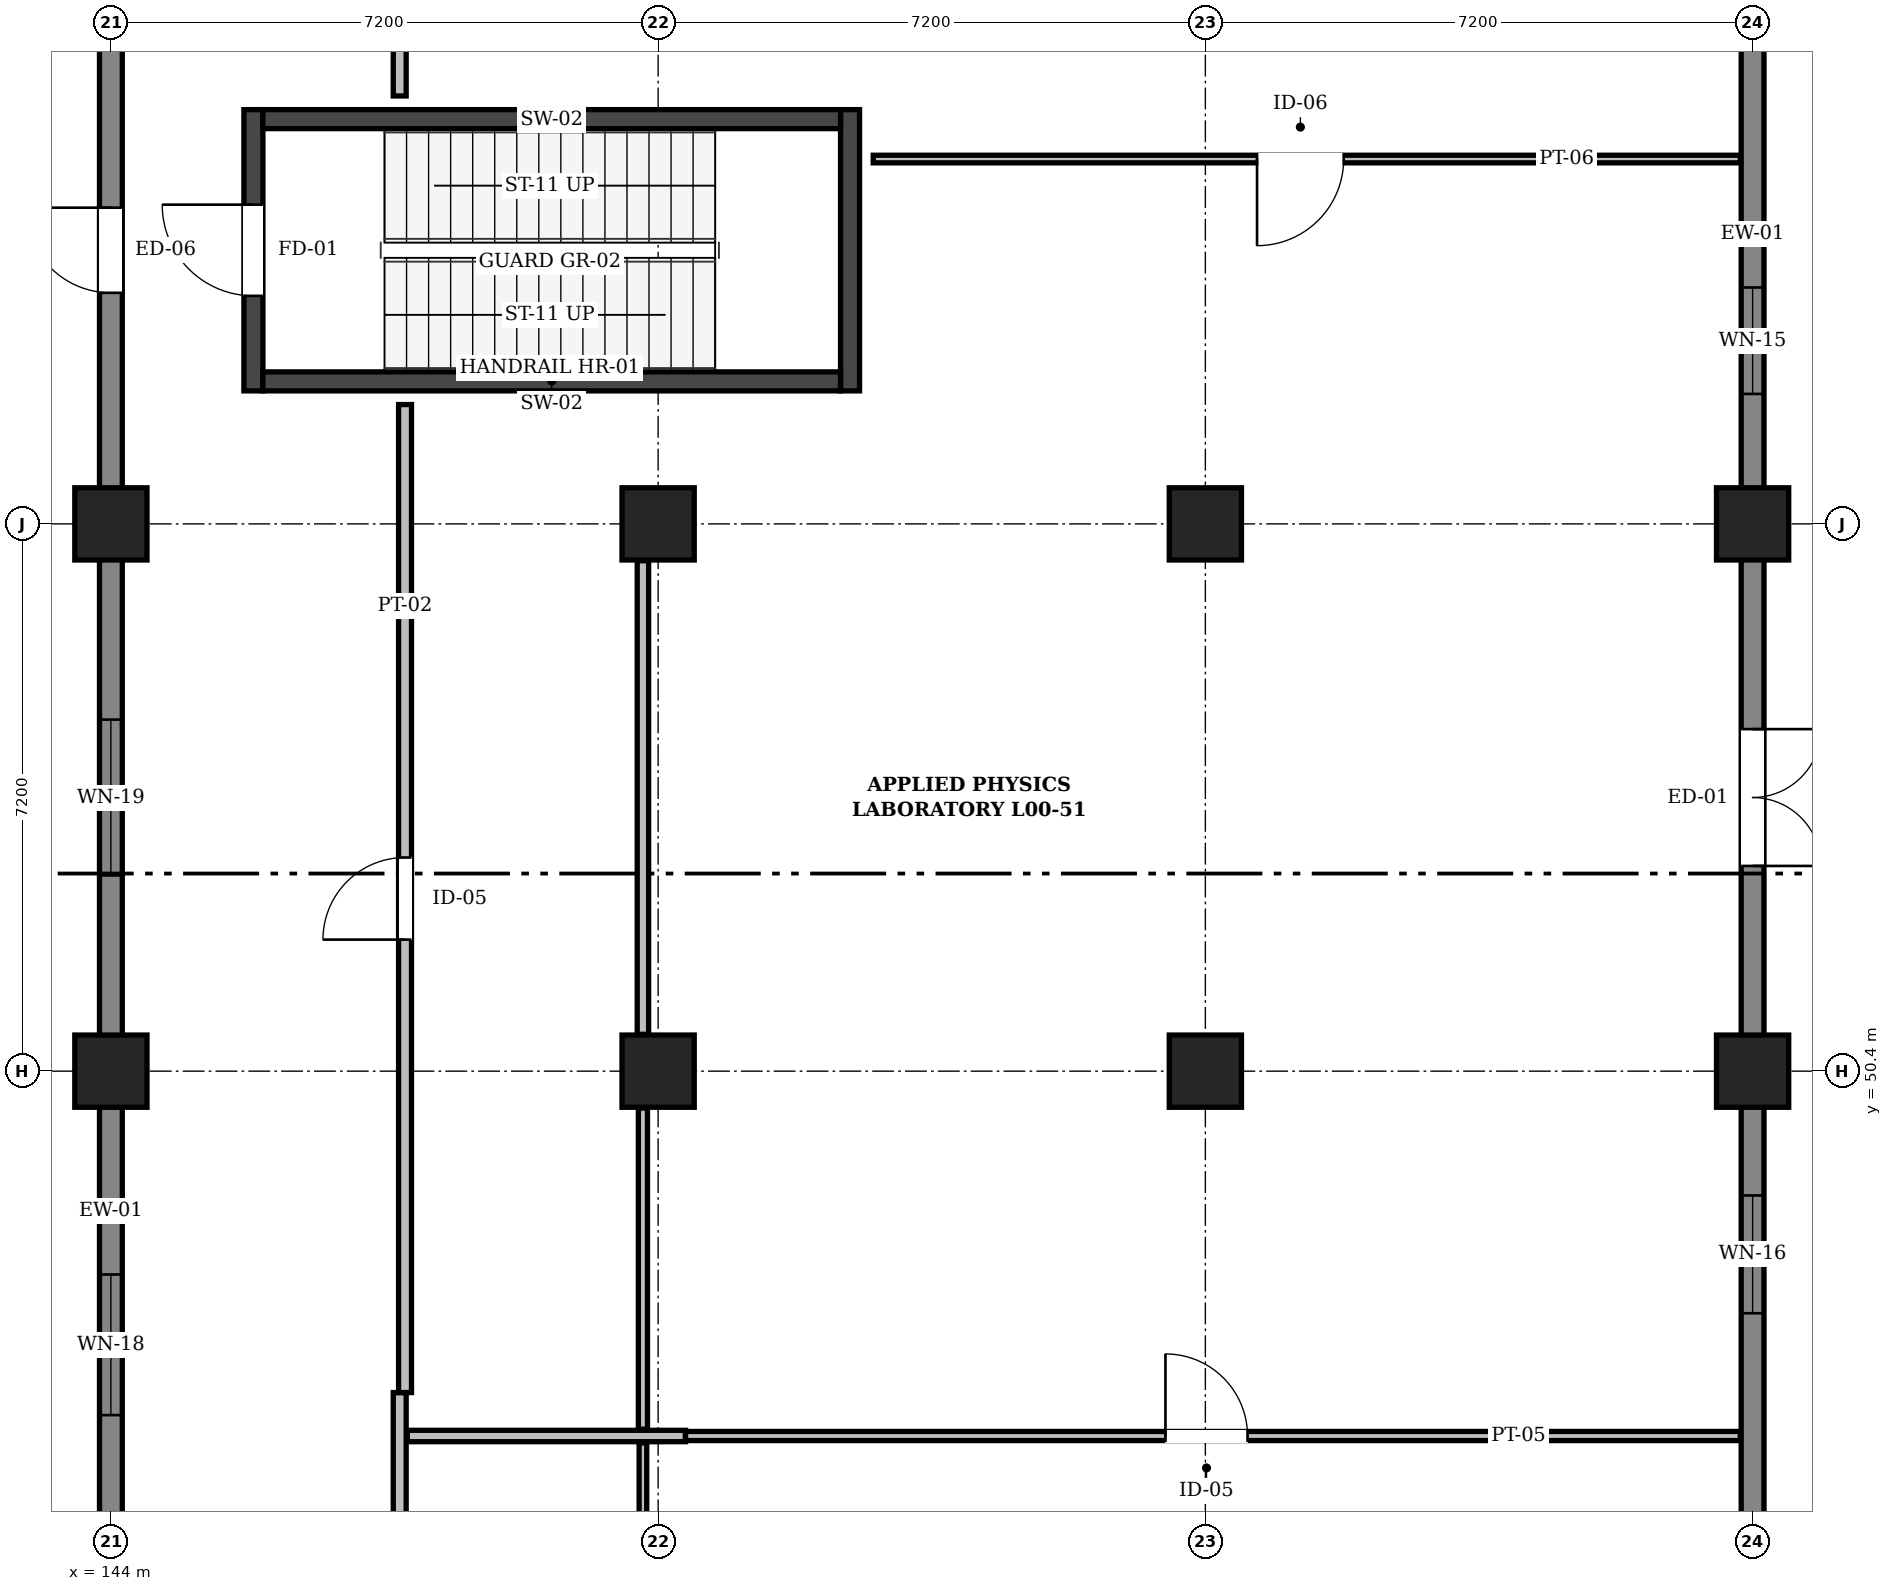
"""IFC4 building model, lengths in metres.
Left out: names, types, materials, properties, quantities, classifications, styles, units other than length and angle.
Written with IfcOpenShell. Run it as: python <this file> out.ifc"""

import sys

from ifc_helpers import new_model, si_unit, direction, frame, frame_2d, origin, origin_2d, place, context, subcontext, project, spatial, rectangle, extrude, element, fill, save


model = new_model("IFC4")
c1 = context("Model", 3, precision=1e-05, world=origin(), true_north=direction((0.0, 1.0)))
c2 = subcontext(c1, "Body", "Model", "MODEL_VIEW")
j1 = project(units=[si_unit("LENGTHUNIT", "METRE"), si_unit("PLANEANGLEUNIT", "RADIAN")], contexts=[c1])
p1 = place(None, origin())
s1 = spatial("IfcSite", under=j1, at=p1, CompositionType="ELEMENT")
p2 = place(p1, origin())
s2 = spatial("IfcBuilding", under=s1, at=p2, CompositionType="ELEMENT")
p3 = place(p2, origin())
s3 = spatial("IfcBuildingStorey", under=s2, at=p3, CompositionType="ELEMENT", Elevation=0.0)
for number, where, z_axis, x_axis in (
    (1, (144.0, 50.4, 0.0), (0.0, 0.0, 1.0), (1.0, 0.0, 0.0)),
    (2, (144.0, 57.6, 0.0), (0.0, 0.0, 1.0), (1.0, 0.0, 0.0)),
    (3, (151.2, 50.4, 0.0), (0.0, 0.0, 1.0), (1.0, 0.0, 0.0)),
    (4, (151.2, 57.6, 0.0), (0.0, 0.0, 1.0), (1.0, 0.0, 0.0)),
    (5, (158.4, 50.4, 0.0), (0.0, 0.0, 1.0), (1.0, 0.0, 0.0)),
    (6, (158.4, 57.6, 0.0), (0.0, 0.0, 1.0), (1.0, 0.0, 0.0)),
    (7, (165.6, 50.4, 0.0), (0.0, 0.0, 1.0), (1.0, 0.0, 0.0)),
    (8, (165.6, 57.6, 0.0), (0.0, 0.0, 1.0), (1.0, 0.0, 0.0)),
):
    element("IfcColumn", number, at=place(p3, frame(where, z_axis=z_axis, x_axis=x_axis)), inside=s3, PredefinedType="COLUMN", context=c2, shape_type="SweptSolid", body=[
        extrude(rectangle(XDim=0.95, YDim=0.95, at=origin_2d()), origin(), (0.0, 0.0, 1.0), 4.8),
    ])
p4 = place(p3, frame((165.6, 64.8, 0.0), z_axis=(0.0, 0.0, 1.0), x_axis=(0.0, -1.0, 0.0)))
e9 = element("IfcWall", 9, at=p4, inside=s3, PredefinedType="SOLIDWALL", context=c2, shape_type="SweptSolid", body=[
    extrude(rectangle(XDim=7.2, YDim=0.3, at=frame_2d((3.6, 0.0))), origin(), (0.0, 0.0, 1.0), 4.52),
])
p5 = place(p4, frame((4.09, 0.0, 0.95)))
e10 = element("IfcOpeningElement", 10, at=p5, cuts=e9, PredefinedType="OPENING", context=c2, shape_type="SweptSolid", body=[
    extrude(rectangle(XDim=1.4, YDim=1.55, at=frame_2d((0.7, 0.775))), frame((0.0, 0.162, 0.0), z_axis=(0.0, -1.0, 0.0), x_axis=(1.0, 0.0, 0.0)), (0.0, 0.0, 1.0), 0.324),
])
p6 = place(p3, frame((165.6, 57.6, 0.0), z_axis=(0.0, 0.0, 1.0), x_axis=(0.0, -1.0, 0.0)))
e11 = element("IfcWall", 11, at=p6, inside=s3, PredefinedType="SOLIDWALL", context=c2, shape_type="SweptSolid", body=[
    extrude(rectangle(XDim=7.2, YDim=0.3, at=frame_2d((3.6, 0.0))), origin(), (0.0, 0.0, 1.0), 4.52),
])
p7 = place(p6, frame((2.7, 0.0, 0.0)))
e12 = element("IfcOpeningElement", 12, at=p7, cuts=e11, PredefinedType="OPENING", context=c2, shape_type="SweptSolid", body=[
    extrude(rectangle(XDim=1.8, YDim=2.2, at=frame_2d((0.9, 1.1))), frame((0.0, 0.162, 0.0), z_axis=(0.0, -1.0, 0.0), x_axis=(1.0, 0.0, 0.0)), (0.0, 0.0, 1.0), 0.324),
])
p8 = place(p3, frame((165.6, 50.4, 0.0), z_axis=(0.0, 0.0, 1.0), x_axis=(0.0, -1.0, 0.0)))
e13 = element("IfcWall", 13, at=p8, inside=s3, PredefinedType="SOLIDWALL", context=c2, shape_type="SweptSolid", body=[
    extrude(rectangle(XDim=7.2, YDim=0.3, at=frame_2d((3.6, 0.0))), origin(), (0.0, 0.0, 1.0), 4.52),
])
p9 = place(p8, frame((1.635, 0.0, 0.95)))
e14 = element("IfcOpeningElement", 14, at=p9, cuts=e13, PredefinedType="OPENING", context=c2, shape_type="SweptSolid", body=[
    extrude(rectangle(XDim=1.55, YDim=1.55, at=frame_2d((0.775, 0.775))), frame((0.0, 0.162, 0.0), z_axis=(0.0, -1.0, 0.0), x_axis=(1.0, 0.0, 0.0)), (0.0, 0.0, 1.0), 0.324),
])
p10 = place(p3, frame((144.0, 43.2, 0.0), z_axis=(0.0, 0.0, 1.0), x_axis=(0.0, 1.0, 0.0)))
e15 = element("IfcWall", 15, at=p10, inside=s3, PredefinedType="SOLIDWALL", context=c2, shape_type="SweptSolid", body=[
    extrude(rectangle(XDim=7.2, YDim=0.3, at=frame_2d((3.6, 0.0))), origin(), (0.0, 0.0, 1.0), 4.52),
])
p11 = place(p10, frame((2.675, 0.0, 0.95)))
e16 = element("IfcOpeningElement", 16, at=p11, cuts=e15, PredefinedType="OPENING", context=c2, shape_type="SweptSolid", body=[
    extrude(rectangle(XDim=1.85, YDim=1.55, at=frame_2d((0.925, 0.775))), frame((0.0, 0.162, 0.0), z_axis=(0.0, -1.0, 0.0), x_axis=(1.0, 0.0, 0.0)), (0.0, 0.0, 1.0), 0.324),
])
p12 = place(p3, frame((144.0, 50.4, 0.0), z_axis=(0.0, 0.0, 1.0), x_axis=(0.0, 1.0, 0.0)))
e17 = element("IfcWall", 17, at=p12, inside=s3, PredefinedType="SOLIDWALL", context=c2, shape_type="SweptSolid", body=[
    extrude(rectangle(XDim=7.2, YDim=0.3, at=frame_2d((3.6, 0.0))), origin(), (0.0, 0.0, 1.0), 4.52),
])
p13 = place(p12, frame((2.575, 0.0, 0.95)))
e18 = element("IfcOpeningElement", 18, at=p13, cuts=e17, PredefinedType="OPENING", context=c2, shape_type="SweptSolid", body=[
    extrude(rectangle(XDim=2.05, YDim=1.55, at=frame_2d((1.025, 0.775))), frame((0.0, 0.162, 0.0), z_axis=(0.0, -1.0, 0.0), x_axis=(1.0, 0.0, 0.0)), (0.0, 0.0, 1.0), 0.324),
])
p14 = place(p3, frame((144.0, 57.6, 0.0), z_axis=(0.0, 0.0, 1.0), x_axis=(0.0, 1.0, 0.0)))
e19 = element("IfcWall", 19, at=p14, inside=s3, PredefinedType="SOLIDWALL", context=c2, shape_type="SweptSolid", body=[
    extrude(rectangle(XDim=7.2, YDim=0.3, at=frame_2d((3.6, 0.0))), origin(), (0.0, 0.0, 1.0), 4.52),
])
p15 = place(p14, frame((3.04, 0.0, 0.0)))
e20 = element("IfcOpeningElement", 20, at=p15, cuts=e19, PredefinedType="OPENING", context=c2, shape_type="SweptSolid", body=[
    extrude(rectangle(XDim=1.12, YDim=2.15, at=frame_2d((0.56, 1.075))), frame((0.0, 0.162, 0.0), z_axis=(0.0, -1.0, 0.0), x_axis=(1.0, 0.0, 0.0)), (0.0, 0.0, 1.0), 0.324),
])
p16 = place(p3, frame((145.875, 59.35, 0.0), z_axis=(0.0, 0.0, 1.0), x_axis=(0.0, 1.0, 0.0)))
e21 = element("IfcWall", 21, at=p16, inside=s3, PredefinedType="SHEAR", context=c2, shape_type="SweptSolid", body=[
    extrude(rectangle(XDim=3.7, YDim=0.25, at=frame_2d((1.85, 0.0))), origin(), (0.0, 0.0, 1.0), 4.55),
])
p17 = place(p16, frame((1.25, 0.0, 0.0)))
e22 = element("IfcOpeningElement", 22, at=p17, cuts=e21, PredefinedType="OPENING", context=c2, shape_type="SweptSolid", body=[
    extrude(rectangle(XDim=1.2, YDim=2.15, at=frame_2d((0.6, 1.075))), frame((0.0, 0.137, 0.0), z_axis=(0.0, -1.0, 0.0), x_axis=(1.0, 0.0, 0.0)), (0.0, 0.0, 1.0), 0.274),
])
p18 = place(p3, frame((153.725, 59.35, 0.0), z_axis=(0.0, 0.0, 1.0), x_axis=(0.0, 1.0, 0.0)))
e23 = element("IfcWall", 23, at=p18, inside=s3, PredefinedType="SHEAR", context=c2, shape_type="SweptSolid", body=[
    extrude(rectangle(XDim=3.7, YDim=0.25, at=frame_2d((1.85, 0.0))), origin(), (0.0, 0.0, 1.0), 4.55),
])
for number, where, z_axis, x_axis in (
    (24, (146.0, 59.475, 0.0), (0.0, 0.0, 1.0), (1.0, 0.0, 0.0)),
    (25, (146.0, 62.925, 0.0), (0.0, 0.0, 1.0), (1.0, 0.0, 0.0)),
):
    element("IfcWall", number, at=place(p3, frame(where, z_axis=z_axis, x_axis=x_axis)), inside=s3, PredefinedType="SHEAR", context=c2, shape_type="SweptSolid", body=[
        extrude(rectangle(XDim=7.6, YDim=0.25, at=frame_2d((3.8, 0.0))), origin(), (0.0, 0.0, 1.0), 4.55),
    ])
p19 = place(p3, frame((147.8, 36.36, 0.0), z_axis=(0.0, 0.0, 1.0), x_axis=(0.0, 1.0, 0.0)))
e26 = element("IfcWall", 26, at=p19, inside=s3, PredefinedType="PARTITIONING", context=c2, shape_type="SweptSolid", body=[
    extrude(rectangle(XDim=9.811, YDim=0.17, at=frame_2d((4.906, 0.0))), origin(), (0.0, 0.0, 1.0), 4.46),
])
p20 = place(p19, frame((4.266, 0.0, 0.0)))
e27 = element("IfcOpeningElement", 27, at=p20, cuts=e26, PredefinedType="OPENING", context=c2, shape_type="SweptSolid", body=[
    extrude(rectangle(XDim=1.28, YDim=2.22, at=frame_2d((0.64, 1.11))), frame((0.0, 0.097, 0.0), z_axis=(0.0, -1.0, 0.0), x_axis=(1.0, 0.0, 0.0)), (0.0, 0.0, 1.0), 0.194),
])
p21 = place(p3, frame((147.87, 46.171, 0.0), z_axis=(0.0, 0.0, 1.0), x_axis=(0.0, 1.0, 0.0)))
e28 = element("IfcWall", 28, at=p21, inside=s3, PredefinedType="PARTITIONING", context=c2, shape_type="SweptSolid", body=[
    extrude(rectangle(XDim=12.999, YDim=0.17, at=frame_2d((6.499, 0.0))), origin(), (0.0, 0.0, 1.0), 4.46),
])
p22 = place(p21, frame((5.959, 0.0, 0.0)))
e29 = element("IfcOpeningElement", 29, at=p22, cuts=e28, PredefinedType="OPENING", context=c2, shape_type="SweptSolid", body=[
    extrude(rectangle(XDim=1.08, YDim=2.2, at=frame_2d((0.54, 1.1))), frame((0.0, 0.097, 0.0), z_axis=(0.0, -1.0, 0.0), x_axis=(1.0, 0.0, 0.0)), (0.0, 0.0, 1.0), 0.194),
])
p23 = place(p3, frame((147.8, 63.23, 0.0), z_axis=(0.0, 0.0, 1.0), x_axis=(0.0, 1.0, 0.0)))
e30 = element("IfcWall", 30, at=p23, inside=s3, PredefinedType="PARTITIONING", context=c2, shape_type="SweptSolid", body=[
    extrude(rectangle(XDim=15.07, YDim=0.17, at=frame_2d((7.535, 0.0))), origin(), (0.0, 0.0, 1.0), 4.46),
])
p24 = place(p23, frame((6.895, 0.0, 0.0)))
e31 = element("IfcOpeningElement", 31, at=p24, cuts=e30, PredefinedType="OPENING", context=c2, shape_type="SweptSolid", body=[
    extrude(rectangle(XDim=1.28, YDim=2.22, at=frame_2d((0.64, 1.11))), frame((0.0, 0.097, 0.0), z_axis=(0.0, -1.0, 0.0), x_axis=(1.0, 0.0, 0.0)), (0.0, 0.0, 1.0), 0.194),
])
p25 = place(p23, frame((12.82, 0.0, 1.05)))
e32 = element("IfcOpeningElement", 32, at=p25, cuts=e30, PredefinedType="OPENING", context=c2, shape_type="SweptSolid", body=[
    extrude(rectangle(XDim=1.8, YDim=1.05, at=frame_2d((0.9, 0.525))), frame((0.0, 0.097, 0.0), z_axis=(0.0, -1.0, 0.0), x_axis=(1.0, 0.0, 0.0)), (0.0, 0.0, 1.0), 0.194),
])
p26 = place(p3, frame((147.9, 45.6, 0.0), z_axis=(0.0, 0.0, 1.0), x_axis=(1.0, 0.0, 0.0)))
e33 = element("IfcWall", 33, at=p26, inside=s3, PredefinedType="PARTITIONING", context=c2, shape_type="SweptSolid", body=[
    extrude(rectangle(XDim=3.66, YDim=0.15, at=frame_2d((1.83, 0.0))), origin(), (0.0, 0.0, 1.0), 4.46),
])
p27 = place(p3, frame((151.0, 43.685, 0.0), z_axis=(0.0, 0.0, 1.0), x_axis=(0.0, 1.0, 0.0)))
e34 = element("IfcWall", 34, at=p27, inside=s3, PredefinedType="PARTITIONING", context=c2, shape_type="SweptSolid", body=[
    extrude(rectangle(XDim=1.825, YDim=0.1, at=frame_2d((0.913, 0.0))), origin(), (0.0, 0.0, 1.0), 4.08),
])
p28 = place(p3, frame((151.0, 50.885, 0.0), z_axis=(0.0, 0.0, 1.0), x_axis=(0.0, 1.0, 0.0)))
e35 = element("IfcWall", 35, at=p28, inside=s3, PredefinedType="PARTITIONING", context=c2, shape_type="SweptSolid", body=[
    extrude(rectangle(XDim=6.23, YDim=0.15, at=frame_2d((3.115, 0.0))), origin(), (0.0, 0.0, 1.0), 4.08),
])
p29 = place(p3, frame((151.0, 45.69, 0.0), z_axis=(0.0, 0.0, 1.0), x_axis=(0.0, 1.0, 0.0)))
e36 = element("IfcWall", 36, at=p29, inside=s3, PredefinedType="PARTITIONING", context=c2, shape_type="SweptSolid", body=[
    extrude(rectangle(XDim=4.225, YDim=0.12, at=frame_2d((2.113, 0.0))), origin(), (0.0, 0.0, 1.0), 4.08),
])
p30 = place(p3, frame((151.56, 45.6, 0.0), z_axis=(0.0, 0.0, 1.0), x_axis=(1.0, 0.0, 0.0)))
e37 = element("IfcWall", 37, at=p30, inside=s3, PredefinedType="PARTITIONING", context=c2, shape_type="SweptSolid", body=[
    extrude(rectangle(XDim=13.878, YDim=0.12, at=frame_2d((6.939, 0.0))), origin(), (0.0, 0.0, 1.0), 4.46),
])
p31 = place(p30, frame((6.315, 0.0, 0.0)))
e38 = element("IfcOpeningElement", 38, at=p31, cuts=e37, PredefinedType="OPENING", context=c2, shape_type="SweptSolid", body=[
    extrude(rectangle(XDim=1.08, YDim=2.2, at=frame_2d((0.54, 1.1))), frame((0.0, 0.072, 0.0), z_axis=(0.0, -1.0, 0.0), x_axis=(1.0, 0.0, 0.0)), (0.0, 0.0, 1.0), 0.144),
])
p32 = place(p3, frame((154.03, 62.4, 0.0), z_axis=(0.0, 0.0, 1.0), x_axis=(1.0, 0.0, 0.0)))
e39 = element("IfcWall", 39, at=p32, inside=s3, PredefinedType="PARTITIONING", context=c2, shape_type="SweptSolid", body=[
    extrude(rectangle(XDim=11.408, YDim=0.1, at=frame_2d((5.704, 0.0))), origin(), (0.0, 0.0, 1.0), 4.46),
])
p33 = place(p32, frame((5.05, 0.0, 0.0)))
e40 = element("IfcOpeningElement", 40, at=p33, cuts=e39, PredefinedType="OPENING", context=c2, shape_type="SweptSolid", body=[
    extrude(rectangle(XDim=1.14, YDim=2.2, at=frame_2d((0.57, 1.1))), frame((0.0, 0.062, 0.0), z_axis=(0.0, -1.0, 0.0), x_axis=(1.0, 0.0, 0.0)), (0.0, 0.0, 1.0), 0.124),
])
p34 = place(p5, origin())
e41 = element("IfcWindow", 41, at=p34, inside=s3, PartitioningType="SINGLE_PANEL", PredefinedType="WINDOW", context=c2, shape_type="SweptSolid", body=[
    extrude(rectangle(XDim=1.4, YDim=1.55, at=frame_2d((0.7, 0.775))), frame((0.0, 0.03, 0.0), z_axis=(0.0, -1.0, 0.0), x_axis=(1.0, 0.0, 0.0)), (0.0, 0.0, 1.0), 0.06),
])
fill(e10, e41)
p35 = place(p7, origin())
e42 = element("IfcDoor", 42, at=p35, inside=s3, OperationType="DOUBLE_DOOR_SINGLE_SWING", PredefinedType="DOOR", context=c2, shape_type="SweptSolid", body=[
    extrude(rectangle(XDim=1.8, YDim=2.2, at=frame_2d((0.9, 1.1))), frame((0.0, 0.025, 0.0), z_axis=(0.0, -1.0, 0.0), x_axis=(1.0, 0.0, 0.0)), (0.0, 0.0, 1.0), 0.05),
])
fill(e12, e42)
p36 = place(p9, origin())
e43 = element("IfcWindow", 43, at=p36, inside=s3, PartitioningType="SINGLE_PANEL", PredefinedType="WINDOW", context=c2, shape_type="SweptSolid", body=[
    extrude(rectangle(XDim=1.55, YDim=1.55, at=frame_2d((0.775, 0.775))), frame((0.0, 0.03, 0.0), z_axis=(0.0, -1.0, 0.0), x_axis=(1.0, 0.0, 0.0)), (0.0, 0.0, 1.0), 0.06),
])
fill(e14, e43)
p37 = place(p11, origin())
e44 = element("IfcWindow", 44, at=p37, inside=s3, PartitioningType="SINGLE_PANEL", PredefinedType="WINDOW", context=c2, shape_type="SweptSolid", body=[
    extrude(rectangle(XDim=1.85, YDim=1.55, at=frame_2d((0.925, 0.775))), frame((0.0, 0.03, 0.0), z_axis=(0.0, -1.0, 0.0), x_axis=(1.0, 0.0, 0.0)), (0.0, 0.0, 1.0), 0.06),
])
fill(e16, e44)
p38 = place(p13, origin())
e45 = element("IfcWindow", 45, at=p38, inside=s3, PartitioningType="SINGLE_PANEL", PredefinedType="WINDOW", context=c2, shape_type="SweptSolid", body=[
    extrude(rectangle(XDim=2.05, YDim=1.55, at=frame_2d((1.025, 0.775))), frame((0.0, 0.03, 0.0), z_axis=(0.0, -1.0, 0.0), x_axis=(1.0, 0.0, 0.0)), (0.0, 0.0, 1.0), 0.06),
])
fill(e18, e45)
p39 = place(p15, origin())
e46 = element("IfcDoor", 46, at=p39, inside=s3, OperationType="SINGLE_SWING_RIGHT", PredefinedType="DOOR", context=c2, shape_type="SweptSolid", body=[
    extrude(rectangle(XDim=1.12, YDim=2.15, at=frame_2d((0.56, 1.075))), frame((0.0, 0.025, 0.0), z_axis=(0.0, -1.0, 0.0), x_axis=(1.0, 0.0, 0.0)), (0.0, 0.0, 1.0), 0.05),
])
fill(e20, e46)
p40 = place(p17, origin())
e47 = element("IfcDoor", 47, at=p40, inside=s3, OperationType="SINGLE_SWING_RIGHT", PredefinedType="DOOR", context=c2, shape_type="SweptSolid", body=[
    extrude(rectangle(XDim=1.2, YDim=2.15, at=frame_2d((0.6, 1.075))), frame((0.0, 0.025, 0.0), z_axis=(0.0, -1.0, 0.0), x_axis=(1.0, 0.0, 0.0)), (0.0, 0.0, 1.0), 0.05),
])
fill(e22, e47)
p41 = place(p22, origin())
e48 = element("IfcDoor", 48, at=p41, inside=s3, OperationType="SINGLE_SWING_LEFT", PredefinedType="DOOR", context=c2, shape_type="SweptSolid", body=[
    extrude(rectangle(XDim=1.08, YDim=2.2, at=frame_2d((0.54, 1.1))), frame((0.0, 0.025, 0.0), z_axis=(0.0, -1.0, 0.0), x_axis=(1.0, 0.0, 0.0)), (0.0, 0.0, 1.0), 0.05),
])
fill(e29, e48)
p42 = place(p31, origin())
e49 = element("IfcDoor", 49, at=p42, inside=s3, OperationType="SINGLE_SWING_LEFT", PredefinedType="DOOR", context=c2, shape_type="SweptSolid", body=[
    extrude(rectangle(XDim=1.08, YDim=2.2, at=frame_2d((0.54, 1.1))), frame((0.0, 0.025, 0.0), z_axis=(0.0, -1.0, 0.0), x_axis=(1.0, 0.0, 0.0)), (0.0, 0.0, 1.0), 0.05),
])
fill(e38, e49)
p43 = place(p33, frame((1.14, 0.0, 0.0), z_axis=(0.0, 0.0, 1.0), x_axis=(-1.0, 0.0, 0.0)))
e50 = element("IfcDoor", 50, at=p43, inside=s3, OperationType="SINGLE_SWING_RIGHT", PredefinedType="DOOR", context=c2, shape_type="SweptSolid", body=[
    extrude(rectangle(XDim=1.14, YDim=2.2, at=frame_2d((0.57, 1.1))), frame((0.0, 0.025, 0.0), z_axis=(0.0, -1.0, 0.0), x_axis=(1.0, 0.0, 0.0)), (0.0, 0.0, 1.0), 0.05),
])
fill(e40, e50)
save(model, sys.argv[1])
